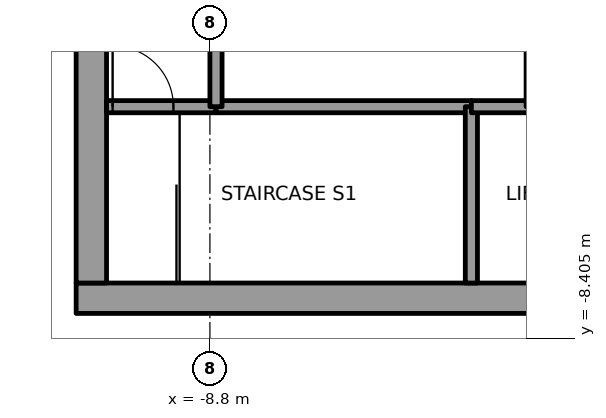
"""IFC4 building model, lengths in metres.
Left out: names, types, materials, properties, quantities, classifications, styles, units other than length and angle.
Written with IfcOpenShell. Run it as: python <this file> out.ifc"""

import sys

from ifc_helpers import new_model, si_unit, direction, frame, frame_2d, origin, place, context, subcontext, project, spatial, rectangle, extrude, element, fill, save


model = new_model("IFC4")
c1 = context("Model", 3, precision=1e-05, world=origin(), true_north=direction((0.0, 1.0)))
c2 = subcontext(c1, "Body", "Model", "MODEL_VIEW")
j1 = project(units=[si_unit("LENGTHUNIT", "METRE"), si_unit("PLANEANGLEUNIT", "RADIAN")], contexts=[c1])
p1 = place(None, origin())
s1 = spatial("IfcSite", under=j1, at=p1, CompositionType="ELEMENT")
p2 = place(p1, origin())
s2 = spatial("IfcBuilding", under=s1, at=p2, CompositionType="ELEMENT")
p3 = place(p2, frame((0.0, 0.0, 355.6)))
s3 = spatial("IfcBuildingStorey", under=s2, at=p3, CompositionType="ELEMENT", Elevation=355.6)
p4 = place(p3, frame((-11.0, -7.75, 0.0), z_axis=(0.0, 0.0, 1.0), x_axis=(1.0, 0.0, 0.0)))
e1 = element("IfcWall", 1, at=p4, inside=s3, PredefinedType="SHEAR", context=c2, shape_type="SweptSolid", body=[
    extrude(rectangle(XDim=22.0, YDim=0.5, at=frame_2d((11.0, 0.0))), origin(), (0.0, 0.0, 1.0), 5.4),
])
p5 = place(p4, frame((10.45, 0.0, 0.0)))
e2 = element("IfcOpeningElement", 2, at=p5, cuts=e1, PredefinedType="OPENING", context=c2, shape_type="SweptSolid", body=[
    extrude(rectangle(XDim=1.1, YDim=2.1, at=frame_2d((0.55, 1.05))), frame((0.0, 0.25, 0.0), z_axis=(0.0, -1.0, 0.0), x_axis=(1.0, 0.0, 0.0)), (0.0, 0.0, 1.0), 0.5),
])
p6 = place(p3, frame((-10.75, -7.5, 0.0), z_axis=(0.0, 0.0, 1.0), x_axis=(0.0, 1.0, 0.0)))
e3 = element("IfcWall", 3, at=p6, inside=s3, PredefinedType="SHEAR", context=c2, shape_type="SweptSolid", body=[
    extrude(rectangle(XDim=15.0, YDim=0.5, at=frame_2d((7.5, 0.0))), origin(), (0.0, 0.0, 1.0), 5.4),
])
p7 = place(p6, frame((6.6, 0.0, 0.0)))
e4 = element("IfcOpeningElement", 4, at=p7, cuts=e3, PredefinedType="OPENING", context=c2, shape_type="SweptSolid", body=[
    extrude(rectangle(XDim=1.8, YDim=2.1, at=frame_2d((0.9, 1.05))), frame((0.0, 0.25, 0.0), z_axis=(0.0, -1.0, 0.0), x_axis=(1.0, 0.0, 0.0)), (0.0, 0.0, 1.0), 0.5),
])
p8 = place(p3, frame((-10.5, -4.6, 0.0), z_axis=(0.0, 0.0, 1.0), x_axis=(1.0, 0.0, 0.0)))
e5 = element("IfcWall", 5, at=p8, inside=s3, PredefinedType="SOLIDWALL", context=c2, shape_type="SweptSolid", body=[
    extrude(rectangle(XDim=1.8, YDim=0.2, at=frame_2d((0.9, 0.0))), origin(), (0.0, 0.0, 1.0), 5.25),
])
p9 = place(p8, frame((0.1, 0.0, 0.0)))
e6 = element("IfcOpeningElement", 6, at=p9, cuts=e5, PredefinedType="OPENING", context=c2, shape_type="SweptSolid", body=[
    extrude(rectangle(XDim=1.0, YDim=2.1, at=frame_2d((0.5, 1.05))), frame((0.0, 0.1, 0.0), z_axis=(0.0, -1.0, 0.0), x_axis=(1.0, 0.0, 0.0)), (0.0, 0.0, 1.0), 0.2),
])
p10 = place(p3, frame((-8.7, -4.6, 0.0), z_axis=(0.0, 0.0, 1.0), x_axis=(1.0, 0.0, 0.0)))
e7 = element("IfcWall", 7, at=p10, inside=s3, PredefinedType="SOLIDWALL", context=c2, shape_type="SweptSolid", body=[
    extrude(rectangle(XDim=4.2, YDim=0.2, at=frame_2d((2.1, 0.0))), origin(), (0.0, 0.0, 1.0), 5.25),
])
p11 = place(p3, frame((-8.7, -1.8, 0.0), z_axis=(0.0, 0.0, 1.0), x_axis=(0.0, -1.0, 0.0)))
e8 = element("IfcWall", 8, at=p11, inside=s3, PredefinedType="SOLIDWALL", context=c2, shape_type="SweptSolid", body=[
    extrude(rectangle(XDim=2.8, YDim=0.2, at=frame_2d((1.4, 0.0))), origin(), (0.0, 0.0, 1.0), 5.25),
])
p12 = place(p3, frame((-4.5, -4.6, 0.0), z_axis=(0.0, 0.0, 1.0), x_axis=(0.0, -1.0, 0.0)))
e9 = element("IfcWall", 9, at=p12, inside=s3, PredefinedType="SOLIDWALL", context=c2, shape_type="SweptSolid", body=[
    extrude(rectangle(XDim=2.9, YDim=0.2, at=frame_2d((1.45, 0.0))), origin(), (0.0, 0.0, 1.0), 5.25),
])
p13 = place(p3, frame((-4.5, -4.6, 0.0), z_axis=(0.0, 0.0, 1.0), x_axis=(1.0, 0.0, 0.0)))
e10 = element("IfcWall", 10, at=p13, inside=s3, PredefinedType="SOLIDWALL", context=c2, shape_type="SweptSolid", body=[
    extrude(rectangle(XDim=1.0, YDim=0.2, at=frame_2d((0.5, 0.0))), origin(), (0.0, 0.0, 1.0), 5.25),
])
p14 = place(p9, origin())
e11 = element("IfcDoor", 11, at=p14, inside=s3, OperationType="SINGLE_SWING_LEFT", PredefinedType="DOOR", context=c2, shape_type="SweptSolid", body=[
    extrude(rectangle(XDim=1.0, YDim=2.1, at=frame_2d((0.5, 1.05))), frame((0.0, 0.025, 0.0), z_axis=(0.0, -1.0, 0.0), x_axis=(1.0, 0.0, 0.0)), (0.0, 0.0, 1.0), 0.05),
])
fill(e6, e11)
save(model, sys.argv[1])
